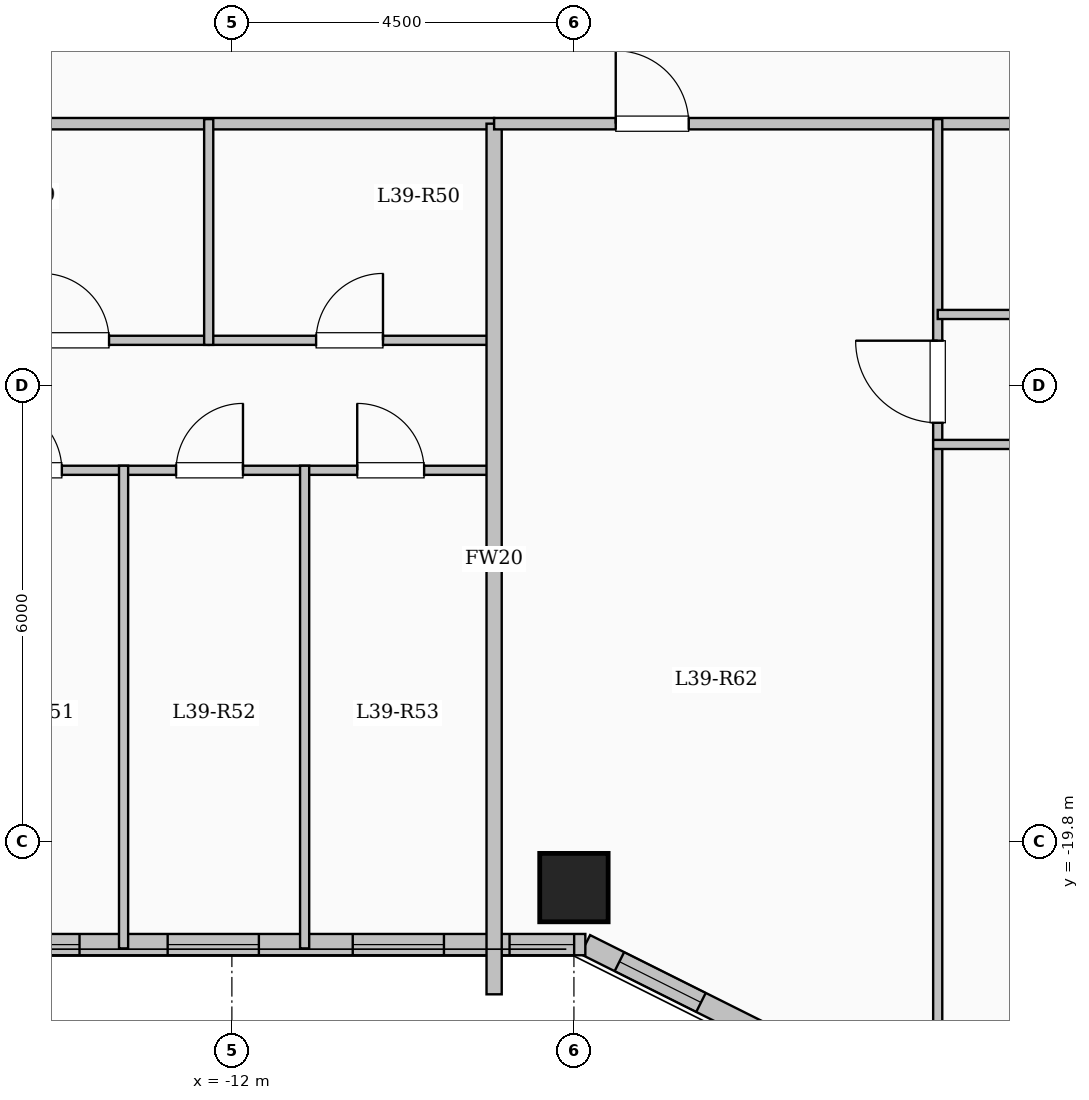
"""IFC4 building model, lengths in metres.
Left out: names, types, materials, properties, quantities, classifications, styles, units other than length and angle.
Written with IfcOpenShell. Run it as: python <this file> out.ifc"""

import sys

from ifc_helpers import new_model, si_unit, direction, frame, frame_2d, origin, origin_2d, place, context, subcontext, project, spatial, rectangle, extrude, element, fill, save


model = new_model("IFC4")
c1 = context("Model", 3, precision=1e-05, world=origin(), true_north=direction((0.0, 1.0)))
c2 = subcontext(c1, "Body", "Model", "MODEL_VIEW")
j1 = project(units=[si_unit("LENGTHUNIT", "METRE"), si_unit("PLANEANGLEUNIT", "RADIAN")], contexts=[c1])
p1 = place(None, origin())
s1 = spatial("IfcSite", under=j1, at=p1, CompositionType="ELEMENT")
p2 = place(p1, origin())
s2 = spatial("IfcBuilding", under=s1, at=p2, CompositionType="ELEMENT")
p3 = place(p2, frame((0.0, 0.0, 146.0)))
s3 = spatial("IfcBuildingStorey", under=s2, at=p3, CompositionType="ELEMENT", Elevation=146.0)
p4 = place(p3, frame((-7.5, -20.4, 0.0), z_axis=(0.0, 0.0, 1.0), x_axis=(1.0, 0.0, 0.0)))
e1 = element("IfcColumn", 1, at=p4, inside=s3, PredefinedType="COLUMN", context=c2, shape_type="SweptSolid", body=[
    extrude(rectangle(XDim=0.9, YDim=0.9, at=origin_2d()), origin(), (0.0, 0.0, 1.0), 3.35),
])
p5 = place(p3, frame((-4.35, -22.65, 0.0), z_axis=(0.0, 0.0, 1.0), x_axis=(-0.894427191, 0.4472135955, 0.0)))
e2 = element("IfcWall", 2, at=p5, inside=s3, PredefinedType="SOLIDWALL", context=c2, shape_type="SweptSolid", body=[
    extrude(rectangle(XDim=3.354, YDim=0.28, at=frame_2d((1.677, 0.0))), origin(), (0.0, 0.0, 1.0), 3.1),
])
p6 = place(p5, frame((1.653, 0.0, 0.95)))
e3 = element("IfcOpeningElement", 3, at=p6, cuts=e2, PredefinedType="OPENING", context=c2, shape_type="SweptSolid", body=[
    extrude(rectangle(XDim=1.2, YDim=1.5, at=frame_2d((0.6, 0.75))), frame((0.0, 0.15, 0.0), z_axis=(0.0, -1.0, 0.0), x_axis=(1.0, 0.0, 0.0)), (0.0, 0.0, 1.0), 0.3),
])
p7 = place(p3, frame((-7.35, -21.15, 0.0), z_axis=(0.0, 0.0, 1.0), x_axis=(-1.0, 0.0, 0.0)))
e4 = element("IfcWall", 4, at=p7, inside=s3, PredefinedType="SOLIDWALL", context=c2, shape_type="SweptSolid", body=[
    extrude(rectangle(XDim=12.3, YDim=0.28, at=frame_2d((6.15, 0.0))), origin(), (0.0, 0.0, 1.0), 3.1),
])
p8 = place(p7, frame((0.147, 0.0, 0.95)))
e5 = element("IfcOpeningElement", 5, at=p8, cuts=e4, PredefinedType="OPENING", context=c2, shape_type="SweptSolid", body=[
    extrude(rectangle(XDim=0.85, YDim=1.5, at=frame_2d((0.425, 0.75))), frame((0.0, 0.15, 0.0), z_axis=(0.0, -1.0, 0.0), x_axis=(1.0, 0.0, 0.0)), (0.0, 0.0, 1.0), 0.3),
])
p9 = place(p7, frame((1.86, 0.0, 0.95)))
e6 = element("IfcOpeningElement", 6, at=p9, cuts=e4, PredefinedType="OPENING", context=c2, shape_type="SweptSolid", body=[
    extrude(rectangle(XDim=1.2, YDim=1.5, at=frame_2d((0.6, 0.75))), frame((0.0, 0.15, 0.0), z_axis=(0.0, -1.0, 0.0), x_axis=(1.0, 0.0, 0.0)), (0.0, 0.0, 1.0), 0.3),
])
p10 = place(p7, frame((4.295, 0.0, 0.95)))
e7 = element("IfcOpeningElement", 7, at=p10, cuts=e4, PredefinedType="OPENING", context=c2, shape_type="SweptSolid", body=[
    extrude(rectangle(XDim=1.2, YDim=1.5, at=frame_2d((0.6, 0.75))), frame((0.0, 0.15, 0.0), z_axis=(0.0, -1.0, 0.0), x_axis=(1.0, 0.0, 0.0)), (0.0, 0.0, 1.0), 0.3),
])
p11 = place(p7, frame((6.655, 0.0, 0.95)))
e8 = element("IfcOpeningElement", 8, at=p11, cuts=e4, PredefinedType="OPENING", context=c2, shape_type="SweptSolid", body=[
    extrude(rectangle(XDim=1.2, YDim=1.5, at=frame_2d((0.6, 0.75))), frame((0.0, 0.15, 0.0), z_axis=(0.0, -1.0, 0.0), x_axis=(1.0, 0.0, 0.0)), (0.0, 0.0, 1.0), 0.3),
])
p12 = place(p7, frame((9.517, 0.0, 0.9)))
e9 = element("IfcOpeningElement", 9, at=p12, cuts=e4, PredefinedType="OPENING", context=c2, shape_type="SweptSolid", body=[
    extrude(rectangle(XDim=1.65, YDim=1.6, at=frame_2d((0.825, 0.8))), frame((0.0, 0.15, 0.0), z_axis=(0.0, -1.0, 0.0), x_axis=(1.0, 0.0, 0.0)), (0.0, 0.0, 1.0), 0.3),
])
p13 = place(p3, frame((-19.55, -10.35, 0.0), z_axis=(0.0, 0.0, 1.0), x_axis=(1.0, 0.0, 0.0)))
e10 = element("IfcWall", 10, at=p13, inside=s3, PredefinedType="PARTITIONING", context=c2, shape_type="SweptSolid", body=[
    extrude(rectangle(XDim=11.0, YDim=0.15, at=frame_2d((5.5, 0.0))), origin(), (0.0, 0.0, 1.0), 3.1),
])
p14 = place(p13, frame((0.7, 0.0, 0.0)))
e11 = element("IfcOpeningElement", 11, at=p14, cuts=e10, PredefinedType="OPENING", context=c2, shape_type="SweptSolid", body=[
    extrude(rectangle(XDim=0.96, YDim=2.15, at=frame_2d((0.48, 1.075))), frame((0.0, 0.085, 0.0), z_axis=(0.0, -1.0, 0.0), x_axis=(1.0, 0.0, 0.0)), (0.0, 0.0, 1.0), 0.17),
])
p15 = place(p3, frame((-15.808, -13.2, 0.0), z_axis=(0.0, 0.0, 1.0), x_axis=(1.0, 0.0, 0.0)))
e12 = element("IfcWall", 12, at=p15, inside=s3, PredefinedType="PARTITIONING", context=c2, shape_type="SweptSolid", body=[
    extrude(rectangle(XDim=3.503, YDim=0.12, at=frame_2d((1.751, 0.0))), origin(), (0.0, 0.0, 1.0), 3.1),
])
p16 = place(p15, frame((1.312, 0.0, 0.0)))
e13 = element("IfcOpeningElement", 13, at=p16, cuts=e12, PredefinedType="OPENING", context=c2, shape_type="SweptSolid", body=[
    extrude(rectangle(XDim=0.88, YDim=2.1, at=frame_2d((0.44, 1.05))), frame((0.0, 0.07, 0.0), z_axis=(0.0, -1.0, 0.0), x_axis=(1.0, 0.0, 0.0)), (0.0, 0.0, 1.0), 0.14),
])
p17 = place(p3, frame((-12.305, -13.2, 0.0), z_axis=(0.0, 0.0, 1.0), x_axis=(1.0, 0.0, 0.0)))
e14 = element("IfcWall", 14, at=p17, inside=s3, PredefinedType="PARTITIONING", context=c2, shape_type="SweptSolid", body=[
    extrude(rectangle(XDim=3.705, YDim=0.12, at=frame_2d((1.853, 0.0))), origin(), (0.0, 0.0, 1.0), 3.1),
])
p18 = place(p17, frame((1.413, 0.0, 0.0)))
e15 = element("IfcOpeningElement", 15, at=p18, cuts=e14, PredefinedType="OPENING", context=c2, shape_type="SweptSolid", body=[
    extrude(rectangle(XDim=0.88, YDim=2.1, at=frame_2d((0.44, 1.05))), frame((0.0, 0.07, 0.0), z_axis=(0.0, -1.0, 0.0), x_axis=(1.0, 0.0, 0.0)), (0.0, 0.0, 1.0), 0.14),
])
p19 = place(p3, frame((-15.868, -14.91, 0.0), z_axis=(0.0, 0.0, 1.0), x_axis=(1.0, 0.0, 0.0)))
e16 = element("IfcWall", 16, at=p19, inside=s3, PredefinedType="PARTITIONING", context=c2, shape_type="SweptSolid", body=[
    extrude(rectangle(XDim=7.328, YDim=0.12, at=frame_2d((3.664, 0.0))), origin(), (0.0, 0.0, 1.0), 3.1),
])
p20 = place(p19, frame((0.751, 0.0, 0.0)))
e17 = element("IfcOpeningElement", 17, at=p20, cuts=e16, PredefinedType="OPENING", context=c2, shape_type="SweptSolid", body=[
    extrude(rectangle(XDim=0.88, YDim=2.1, at=frame_2d((0.44, 1.05))), frame((0.0, 0.07, 0.0), z_axis=(0.0, -1.0, 0.0), x_axis=(1.0, 0.0, 0.0)), (0.0, 0.0, 1.0), 0.14),
])
p21 = place(p19, frame((3.134, 0.0, 0.0)))
e18 = element("IfcOpeningElement", 18, at=p21, cuts=e16, PredefinedType="OPENING", context=c2, shape_type="SweptSolid", body=[
    extrude(rectangle(XDim=0.88, YDim=2.1, at=frame_2d((0.44, 1.05))), frame((0.0, 0.07, 0.0), z_axis=(0.0, -1.0, 0.0), x_axis=(1.0, 0.0, 0.0)), (0.0, 0.0, 1.0), 0.14),
])
p22 = place(p19, frame((5.517, 0.0, 0.0)))
e19 = element("IfcOpeningElement", 19, at=p22, cuts=e16, PredefinedType="OPENING", context=c2, shape_type="SweptSolid", body=[
    extrude(rectangle(XDim=0.88, YDim=2.1, at=frame_2d((0.44, 1.05))), frame((0.0, 0.07, 0.0), z_axis=(0.0, -1.0, 0.0), x_axis=(1.0, 0.0, 0.0)), (0.0, 0.0, 1.0), 0.14),
])
p23 = place(p3, frame((-12.305, -13.26, 0.0), z_axis=(0.0, 0.0, 1.0), x_axis=(0.0, 1.0, 0.0)))
e20 = element("IfcWall", 20, at=p23, inside=s3, PredefinedType="PARTITIONING", context=c2, shape_type="SweptSolid", body=[
    extrude(rectangle(XDim=2.97, YDim=0.12, at=frame_2d((1.485, 0.0))), origin(), (0.0, 0.0, 1.0), 3.1),
])
for number, where, z_axis, x_axis in (
    (21, (-13.425, -21.2, 0.0), (0.0, 0.0, 1.0), (0.0, 1.0, 0.0)),
    (22, (-11.043, -21.2, 0.0), (0.0, 0.0, 1.0), (0.0, 1.0, 0.0)),
):
    element("IfcWall", number, at=place(p3, frame(where, z_axis=z_axis, x_axis=x_axis)), inside=s3, PredefinedType="PARTITIONING", context=c2, shape_type="SweptSolid", body=[
        extrude(rectangle(XDim=6.35, YDim=0.12, at=frame_2d((3.175, 0.0))), origin(), (0.0, 0.0, 1.0), 3.1),
    ])
p24 = place(p3, frame((-8.55, -21.804, 0.0), z_axis=(0.0, 0.0, 1.0), x_axis=(0.0, 1.0, 0.0)))
e23 = element("IfcWall", 23, at=p24, inside=s3, PredefinedType="SOLIDWALL", context=c2, shape_type="SweptSolid", body=[
    extrude(rectangle(XDim=11.454, YDim=0.2, at=frame_2d((5.727, 0.0))), origin(), (0.0, 0.0, 1.0), 3.1),
])
p25 = place(p3, frame((-8.55, -10.35, 0.0), z_axis=(0.0, 0.0, 1.0), x_axis=(1.0, 0.0, 0.0)))
e24 = element("IfcWall", 24, at=p25, inside=s3, PredefinedType="PARTITIONING", context=c2, shape_type="SweptSolid", body=[
    extrude(rectangle(XDim=17.1, YDim=0.15, at=frame_2d((8.55, 0.0))), origin(), (0.0, 0.0, 1.0), 3.1),
])
p26 = place(p25, frame((1.6, 0.0, 0.0)))
e25 = element("IfcOpeningElement", 25, at=p26, cuts=e24, PredefinedType="OPENING", context=c2, shape_type="SweptSolid", body=[
    extrude(rectangle(XDim=0.96, YDim=2.15, at=frame_2d((0.48, 1.075))), frame((0.0, 0.085, 0.0), z_axis=(0.0, -1.0, 0.0), x_axis=(1.0, 0.0, 0.0)), (0.0, 0.0, 1.0), 0.17),
])
p27 = place(p3, frame((-2.714, -22.68, 0.0), z_axis=(0.0, 0.0, 1.0), x_axis=(0.0, 1.0, 0.0)))
e26 = element("IfcWall", 26, at=p27, inside=s3, PredefinedType="PARTITIONING", context=c2, shape_type="SweptSolid", body=[
    extrude(rectangle(XDim=12.39, YDim=0.12, at=frame_2d((6.195, 0.0))), origin(), (0.0, 0.0, 1.0), 3.1),
])
p28 = place(p27, frame((8.395, 0.0, 0.0)))
e27 = element("IfcOpeningElement", 27, at=p28, cuts=e26, PredefinedType="OPENING", context=c2, shape_type="SweptSolid", body=[
    extrude(rectangle(XDim=1.08, YDim=2.15, at=frame_2d((0.54, 1.075))), frame((0.0, 0.07, 0.0), z_axis=(0.0, -1.0, 0.0), x_axis=(1.0, 0.0, 0.0)), (0.0, 0.0, 1.0), 0.14),
])
p29 = place(p3, frame((-2.714, -12.86, 0.0), z_axis=(0.0, 0.0, 1.0), x_axis=(1.0, 0.0, 0.0)))
e28 = element("IfcWall", 28, at=p29, inside=s3, PredefinedType="PARTITIONING", context=c2, shape_type="SweptSolid", body=[
    extrude(rectangle(XDim=6.381, YDim=0.12, at=frame_2d((3.19, 0.0))), origin(), (0.0, 0.0, 1.0), 3.1),
])
p30 = place(p29, frame((2.751, 0.0, 0.0)))
e29 = element("IfcOpeningElement", 29, at=p30, cuts=e28, PredefinedType="OPENING", context=c2, shape_type="SweptSolid", body=[
    extrude(rectangle(XDim=0.88, YDim=2.1, at=frame_2d((0.44, 1.05))), frame((0.0, 0.07, 0.0), z_axis=(0.0, -1.0, 0.0), x_axis=(1.0, 0.0, 0.0)), (0.0, 0.0, 1.0), 0.14),
])
p31 = place(p3, frame((-2.774, -14.57, 0.0), z_axis=(0.0, 0.0, 1.0), x_axis=(1.0, 0.0, 0.0)))
e30 = element("IfcWall", 30, at=p31, inside=s3, PredefinedType="PARTITIONING", context=c2, shape_type="SweptSolid", body=[
    extrude(rectangle(XDim=11.384, YDim=0.12, at=frame_2d((5.692, 0.0))), origin(), (0.0, 0.0, 1.0), 3.1),
])
p32 = place(p31, frame((1.426, 0.0, 0.0)))
e31 = element("IfcOpeningElement", 31, at=p32, cuts=e30, PredefinedType="OPENING", context=c2, shape_type="SweptSolid", body=[
    extrude(rectangle(XDim=0.88, YDim=2.1, at=frame_2d((0.44, 1.05))), frame((0.0, 0.07, 0.0), z_axis=(0.0, -1.0, 0.0), x_axis=(1.0, 0.0, 0.0)), (0.0, 0.0, 1.0), 0.14),
])
p33 = place(p31, frame((5.157, 0.0, 0.0)))
e32 = element("IfcOpeningElement", 32, at=p33, cuts=e30, PredefinedType="OPENING", context=c2, shape_type="SweptSolid", body=[
    extrude(rectangle(XDim=0.88, YDim=2.1, at=frame_2d((0.44, 1.05))), frame((0.0, 0.07, 0.0), z_axis=(0.0, -1.0, 0.0), x_axis=(1.0, 0.0, 0.0)), (0.0, 0.0, 1.0), 0.14),
])
p34 = place(p31, frame((8.888, 0.0, 0.0)))
e33 = element("IfcOpeningElement", 33, at=p34, cuts=e30, PredefinedType="OPENING", context=c2, shape_type="SweptSolid", body=[
    extrude(rectangle(XDim=0.88, YDim=2.1, at=frame_2d((0.44, 1.05))), frame((0.0, 0.07, 0.0), z_axis=(0.0, -1.0, 0.0), x_axis=(1.0, 0.0, 0.0)), (0.0, 0.0, 1.0), 0.14),
])
p35 = place(p6, origin())
e34 = element("IfcWindow", 34, at=p35, inside=s3, PartitioningType="SINGLE_PANEL", PredefinedType="WINDOW", context=c2, shape_type="SweptSolid", body=[
    extrude(rectangle(XDim=1.2, YDim=1.5, at=frame_2d((0.6, 0.75))), frame((0.0, 0.03, 0.0), z_axis=(0.0, -1.0, 0.0), x_axis=(1.0, 0.0, 0.0)), (0.0, 0.0, 1.0), 0.06),
])
fill(e3, e34)
p36 = place(p8, origin())
e35 = element("IfcWindow", 35, at=p36, inside=s3, PartitioningType="SINGLE_PANEL", PredefinedType="WINDOW", context=c2, shape_type="SweptSolid", body=[
    extrude(rectangle(XDim=0.85, YDim=1.5, at=frame_2d((0.425, 0.75))), frame((0.0, 0.03, 0.0), z_axis=(0.0, -1.0, 0.0), x_axis=(1.0, 0.0, 0.0)), (0.0, 0.0, 1.0), 0.06),
])
fill(e5, e35)
p37 = place(p9, origin())
e36 = element("IfcWindow", 36, at=p37, inside=s3, PartitioningType="SINGLE_PANEL", PredefinedType="WINDOW", context=c2, shape_type="SweptSolid", body=[
    extrude(rectangle(XDim=1.2, YDim=1.5, at=frame_2d((0.6, 0.75))), frame((0.0, 0.03, 0.0), z_axis=(0.0, -1.0, 0.0), x_axis=(1.0, 0.0, 0.0)), (0.0, 0.0, 1.0), 0.06),
])
fill(e6, e36)
p38 = place(p10, origin())
e37 = element("IfcWindow", 37, at=p38, inside=s3, PartitioningType="SINGLE_PANEL", PredefinedType="WINDOW", context=c2, shape_type="SweptSolid", body=[
    extrude(rectangle(XDim=1.2, YDim=1.5, at=frame_2d((0.6, 0.75))), frame((0.0, 0.03, 0.0), z_axis=(0.0, -1.0, 0.0), x_axis=(1.0, 0.0, 0.0)), (0.0, 0.0, 1.0), 0.06),
])
fill(e7, e37)
p39 = place(p11, origin())
e38 = element("IfcWindow", 38, at=p39, inside=s3, PartitioningType="SINGLE_PANEL", PredefinedType="WINDOW", context=c2, shape_type="SweptSolid", body=[
    extrude(rectangle(XDim=1.2, YDim=1.5, at=frame_2d((0.6, 0.75))), frame((0.0, 0.03, 0.0), z_axis=(0.0, -1.0, 0.0), x_axis=(1.0, 0.0, 0.0)), (0.0, 0.0, 1.0), 0.06),
])
fill(e8, e38)
p40 = place(p16, origin())
e39 = element("IfcDoor", 39, at=p40, inside=s3, OperationType="SINGLE_SWING_LEFT", PredefinedType="DOOR", context=c2, shape_type="SweptSolid", body=[
    extrude(rectangle(XDim=0.88, YDim=2.1, at=frame_2d((0.44, 1.05))), frame((0.0, 0.025, 0.0), z_axis=(0.0, -1.0, 0.0), x_axis=(1.0, 0.0, 0.0)), (0.0, 0.0, 1.0), 0.05),
])
fill(e13, e39)
p41 = place(p18, origin())
e40 = element("IfcDoor", 40, at=p41, inside=s3, OperationType="SINGLE_SWING_RIGHT", PredefinedType="DOOR", context=c2, shape_type="SweptSolid", body=[
    extrude(rectangle(XDim=0.88, YDim=2.1, at=frame_2d((0.44, 1.05))), frame((0.0, 0.025, 0.0), z_axis=(0.0, -1.0, 0.0), x_axis=(1.0, 0.0, 0.0)), (0.0, 0.0, 1.0), 0.05),
])
fill(e15, e40)
p42 = place(p20, origin())
e41 = element("IfcDoor", 41, at=p42, inside=s3, OperationType="SINGLE_SWING_LEFT", PredefinedType="DOOR", context=c2, shape_type="SweptSolid", body=[
    extrude(rectangle(XDim=0.88, YDim=2.1, at=frame_2d((0.44, 1.05))), frame((0.0, 0.025, 0.0), z_axis=(0.0, -1.0, 0.0), x_axis=(1.0, 0.0, 0.0)), (0.0, 0.0, 1.0), 0.05),
])
fill(e17, e41)
p43 = place(p21, origin())
e42 = element("IfcDoor", 42, at=p43, inside=s3, OperationType="SINGLE_SWING_RIGHT", PredefinedType="DOOR", context=c2, shape_type="SweptSolid", body=[
    extrude(rectangle(XDim=0.88, YDim=2.1, at=frame_2d((0.44, 1.05))), frame((0.0, 0.025, 0.0), z_axis=(0.0, -1.0, 0.0), x_axis=(1.0, 0.0, 0.0)), (0.0, 0.0, 1.0), 0.05),
])
fill(e18, e42)
p44 = place(p22, origin())
e43 = element("IfcDoor", 43, at=p44, inside=s3, OperationType="SINGLE_SWING_LEFT", PredefinedType="DOOR", context=c2, shape_type="SweptSolid", body=[
    extrude(rectangle(XDim=0.88, YDim=2.1, at=frame_2d((0.44, 1.05))), frame((0.0, 0.025, 0.0), z_axis=(0.0, -1.0, 0.0), x_axis=(1.0, 0.0, 0.0)), (0.0, 0.0, 1.0), 0.05),
])
fill(e19, e43)
p45 = place(p26, origin())
e44 = element("IfcDoor", 44, at=p45, inside=s3, OperationType="SINGLE_SWING_LEFT", PredefinedType="DOOR", context=c2, shape_type="SweptSolid", body=[
    extrude(rectangle(XDim=0.96, YDim=2.15, at=frame_2d((0.48, 1.075))), frame((0.0, 0.025, 0.0), z_axis=(0.0, -1.0, 0.0), x_axis=(1.0, 0.0, 0.0)), (0.0, 0.0, 1.0), 0.05),
])
fill(e25, e44)
p46 = place(p28, origin())
e45 = element("IfcDoor", 45, at=p46, inside=s3, OperationType="SINGLE_SWING_RIGHT", PredefinedType="DOOR", context=c2, shape_type="SweptSolid", body=[
    extrude(rectangle(XDim=1.08, YDim=2.15, at=frame_2d((0.54, 1.075))), frame((0.0, 0.025, 0.0), z_axis=(0.0, -1.0, 0.0), x_axis=(1.0, 0.0, 0.0)), (0.0, 0.0, 1.0), 0.05),
])
fill(e27, e45)
save(model, sys.argv[1])
